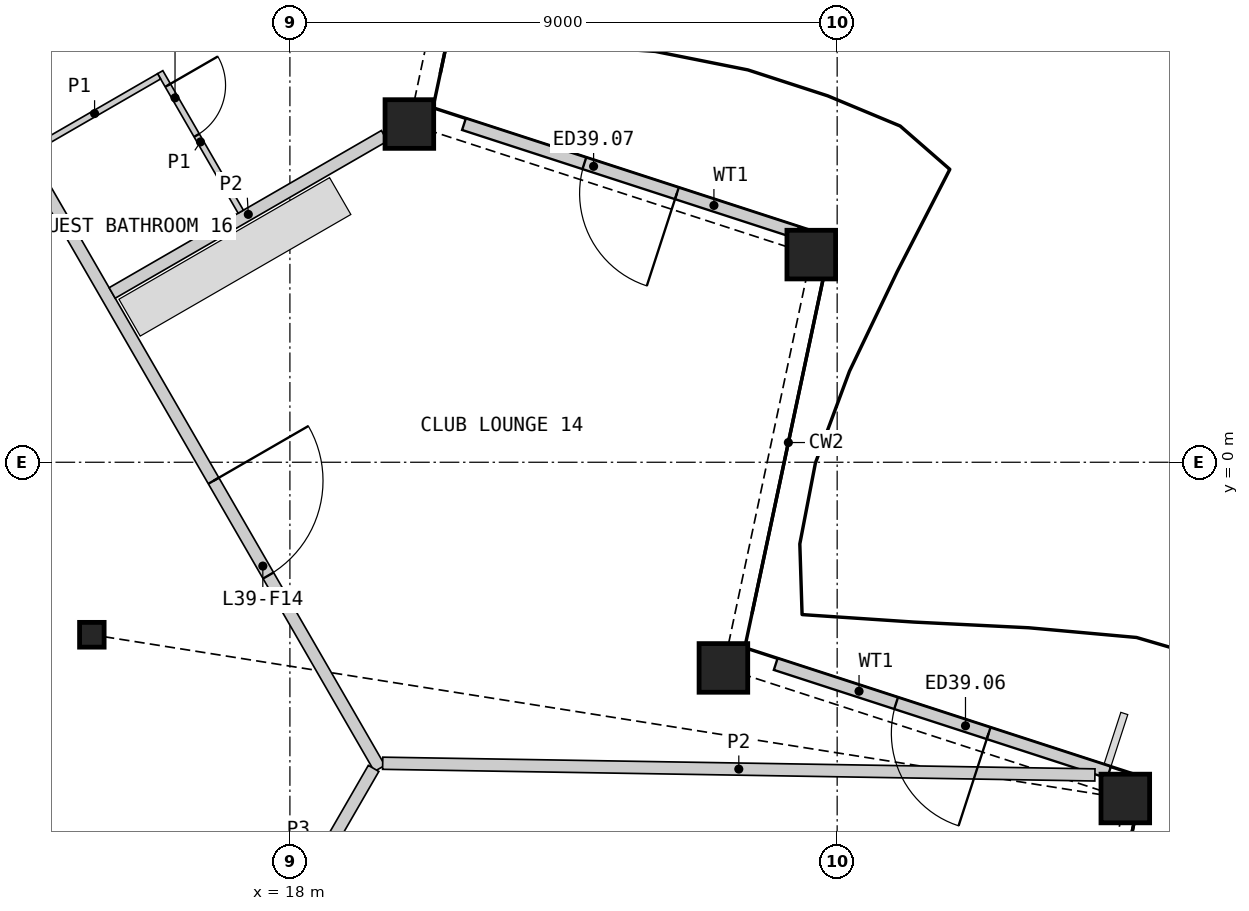
"""IFC4 building model, lengths in metres.
Left out: names, types, materials, properties, quantities, classifications, styles, units other than length and angle.
Written with IfcOpenShell. Run it as: python <this file> out.ifc"""

import sys

from ifc_helpers import new_model, si_unit, direction, frame, frame_2d, origin, origin_2d, place, context, subcontext, project, spatial, rectangle, hollow_rectangle, i_section, extrude, element, fill, save


model = new_model("IFC4")
c1 = context("Model", 3, precision=1e-05, world=origin(), true_north=direction((0.0, 1.0)))
c2 = subcontext(c1, "Body", "Model", "MODEL_VIEW")
j1 = project(units=[si_unit("LENGTHUNIT", "METRE"), si_unit("PLANEANGLEUNIT", "RADIAN")], contexts=[c1])
p1 = place(None, origin())
s1 = spatial("IfcSite", under=j1, at=p1, CompositionType="ELEMENT")
p2 = place(p1, origin())
s2 = spatial("IfcBuilding", under=s1, at=p2, CompositionType="ELEMENT")
p3 = place(p2, frame((0.0, 0.0, 183.6)))
s3 = spatial("IfcBuildingStorey", under=s2, at=p3, CompositionType="ELEMENT", Elevation=183.6)
for number, where, z_axis, x_axis in (
    (1, (31.739, -5.53, 0.0), (0.0, 0.0, 1.0), (1.0, 0.0, 0.0)),
    (2, (25.129, -3.383, 0.0), (0.0, 0.0, 1.0), (1.0, 0.0, 0.0)),
    (3, (26.574, 3.415, 0.0), (0.0, 0.0, 1.0), (1.0, 0.0, 0.0)),
    (4, (19.965, 5.563, 0.0), (0.0, 0.0, 1.0), (1.0, 0.0, 0.0)),
):
    element("IfcColumn", number, at=place(p3, frame(where, z_axis=z_axis, x_axis=x_axis)), inside=s3, PredefinedType="COLUMN", context=c2, shape_type="SweptSolid", body=[
        extrude(hollow_rectangle(XDim=0.8, YDim=0.8, WallThickness=0.05, at=origin_2d()), origin(), (0.0, 0.0, 1.0), 3.6),
    ])
p4 = place(p3, frame((14.743, -2.837, 0.0), z_axis=(0.0, 0.0, 1.0), x_axis=(1.0, 0.0, 0.0)))
e5 = element("IfcColumn", 5, at=p4, inside=s3, PredefinedType="COLUMN", context=c2, shape_type="SweptSolid", body=[
    extrude(i_section(OverallWidth=0.404, OverallDepth=0.407, WebThickness=0.027, FlangeThickness=0.044, at=origin_2d()), origin(), (0.0, 0.0, 1.0), 3.6),
])
p5 = place(p3, frame((31.471, -5.101, 0.0), z_axis=(0.0, 0.0, 1.0), x_axis=(-0.951053678976, 0.30902572661, 0.0)))
e6 = element("IfcWall", 6, at=p5, inside=s3, PredefinedType="SOLIDWALL", context=c2, shape_type="SweptSolid", body=[
    extrude(rectangle(XDim=5.763, YDim=0.2, at=frame_2d((2.882, 0.0))), origin(), (0.0, 0.0, 1.0), 2.701),
])
p6 = place(p5, frame((2.082, 0.0, 0.0)))
e7 = element("IfcOpeningElement", 7, at=p6, cuts=e6, PredefinedType="OPENING", context=c2, shape_type="SweptSolid", body=[
    extrude(rectangle(XDim=1.6, YDim=2.4, at=frame_2d((0.8, 1.2))), frame((0.0, 0.11, 0.0), z_axis=(0.0, -1.0, 0.0), x_axis=(1.0, 0.0, 0.0)), (0.0, 0.0, 1.0), 0.22),
])
p7 = place(p3, frame((26.344, 3.779, 0.0), z_axis=(0.0, 0.0, 1.0), x_axis=(-0.951049633358, 0.309038177075, 0.0)))
e8 = element("IfcWall", 8, at=p7, inside=s3, PredefinedType="SOLIDWALL", context=c2, shape_type="SweptSolid", body=[
    extrude(rectangle(XDim=5.763, YDim=0.2, at=frame_2d((2.881, 0.0))), origin(), (0.0, 0.0, 1.0), 2.701),
])
p8 = place(p7, frame((2.082, 0.0, 0.0)))
e9 = element("IfcOpeningElement", 9, at=p8, cuts=e8, PredefinedType="OPENING", context=c2, shape_type="SweptSolid", body=[
    extrude(rectangle(XDim=1.6, YDim=2.4, at=frame_2d((0.8, 1.2))), frame((0.0, 0.11, 0.0), z_axis=(0.0, -1.0, 0.0), x_axis=(1.0, 0.0, 0.0)), (0.0, 0.0, 1.0), 0.22),
])
p9 = place(p3, frame((14.526, -8.011, 0.0), z_axis=(0.0, 0.0, 1.0), x_axis=(-0.499996970966, 0.866027152591, 0.0)))
e10 = element("IfcWall", 10, at=p9, inside=s3, PredefinedType="SHEAR", context=c2, shape_type="SweptSolid", body=[
    extrude(rectangle(XDim=3.798, YDim=0.75, at=frame_2d((1.899, 0.0))), origin(), (0.0, 0.0, 1.0), 3.25),
])
p10 = place(p3, frame((5.377, 19.385, 0.0), z_axis=(0.0, 0.0, 1.0), x_axis=(0.500000757641, -0.86602496636, 0.0)))
e11 = element("IfcWall", 11, at=p10, inside=s3, PredefinedType="PARTITIONING", context=c2, shape_type="SweptSolid", body=[
    extrude(rectangle(XDim=28.198, YDim=0.2, at=frame_2d((14.099, 0.0))), origin(), (0.0, 0.0, 1.0), 3.25),
])
p11 = place(p10, frame((22.735, 0.0, 0.0)))
e12 = element("IfcOpeningElement", 12, at=p11, cuts=e11, PredefinedType="OPENING", context=c2, shape_type="SweptSolid", body=[
    extrude(rectangle(XDim=1.8, YDim=2.1, at=frame_2d((0.9, 1.05))), frame((0.0, 0.11, 0.0), z_axis=(0.0, -1.0, 0.0), x_axis=(1.0, 0.0, 0.0)), (0.0, 0.0, 1.0), 0.22),
])
p12 = place(p10, frame((14.402, 0.0, 0.0)))
e13 = element("IfcOpeningElement", 13, at=p12, cuts=e11, PredefinedType="OPENING", context=c2, shape_type="SweptSolid", body=[
    extrude(rectangle(XDim=1.0, YDim=2.1, at=frame_2d((0.5, 1.05))), frame((0.0, 0.11, 0.0), z_axis=(0.0, -1.0, 0.0), x_axis=(1.0, 0.0, 0.0)), (0.0, 0.0, 1.0), 0.22),
])
p13 = place(p10, frame((12.796, 0.0, 0.0)))
e14 = element("IfcOpeningElement", 14, at=p13, cuts=e11, PredefinedType="OPENING", context=c2, shape_type="SweptSolid", body=[
    extrude(rectangle(XDim=1.0, YDim=2.1, at=frame_2d((0.5, 1.05))), frame((0.0, 0.11, 0.0), z_axis=(0.0, -1.0, 0.0), x_axis=(1.0, 0.0, 0.0)), (0.0, 0.0, 1.0), 0.22),
])
p14 = place(p10, frame((4.164, 0.0, 0.0)))
e15 = element("IfcOpeningElement", 15, at=p14, cuts=e11, PredefinedType="OPENING", context=c2, shape_type="SweptSolid", body=[
    extrude(rectangle(XDim=1.0, YDim=2.1, at=frame_2d((0.5, 1.05))), frame((0.0, 0.11, 0.0), z_axis=(0.0, -1.0, 0.0), x_axis=(1.0, 0.0, 0.0)), (0.0, 0.0, 1.0), 0.22),
])
p15 = place(p10, frame((1.452, 0.0, 0.0)))
e16 = element("IfcOpeningElement", 16, at=p15, cuts=e11, PredefinedType="OPENING", context=c2, shape_type="SweptSolid", body=[
    extrude(rectangle(XDim=0.95, YDim=2.1, at=frame_2d((0.475, 1.05))), frame((0.0, 0.11, 0.0), z_axis=(0.0, -1.0, 0.0), x_axis=(1.0, 0.0, 0.0)), (0.0, 0.0, 1.0), 0.22),
])
p16 = place(p3, frame((17.875, -7.635, 0.0), z_axis=(0.0, 0.0, 1.0), x_axis=(0.499952404951, 0.866052881055, 0.0)))
e17 = element("IfcWall", 17, at=p16, inside=s3, PredefinedType="PARTITIONING", context=c2, shape_type="SweptSolid", body=[
    extrude(rectangle(XDim=3.002, YDim=0.2, at=frame_2d((1.501, 0.0))), origin(), (0.0, 0.0, 1.0), 3.25),
])
p17 = place(p3, frame((19.526, -4.95, 0.0), z_axis=(0.0, 0.0, 1.0), x_axis=(0.99986514458, -0.016422321819, 0.0)))
e18 = element("IfcWall", 18, at=p17, inside=s3, PredefinedType="PARTITIONING", context=c2, shape_type="SweptSolid", body=[
    extrude(rectangle(XDim=11.715, YDim=0.2, at=frame_2d((5.857, 0.0))), origin(), (0.0, 0.0, 1.0), 2.404),
])
p18 = place(p3, frame((15.077, 2.784, 0.0), z_axis=(0.0, 0.0, 1.0), x_axis=(0.866020469142, 0.500008546953, 0.0)))
e19 = element("IfcWall", 19, at=p18, inside=s3, PredefinedType="PARTITIONING", context=c2, shape_type="SweptSolid", body=[
    extrude(rectangle(XDim=5.171, YDim=0.2, at=frame_2d((2.585, 0.0))), origin(), (0.0, 0.0, 1.0), 2.404),
])
p19 = place(p3, frame((15.867, 6.416, 0.0), z_axis=(0.0, 0.0, 1.0), x_axis=(0.500062700197, -0.865989200783, 0.0)))
e20 = element("IfcWall", 20, at=p19, inside=s3, PredefinedType="PARTITIONING", context=c2, shape_type="SweptSolid", body=[
    extrude(rectangle(XDim=2.65, YDim=0.1, at=frame_2d((1.325, 0.0))), origin(), (0.0, 0.0, 1.0), 2.404),
])
p20 = place(p19, frame((0.25, 0.0, 0.0)))
e21 = element("IfcOpeningElement", 21, at=p20, cuts=e20, PredefinedType="OPENING", context=c2, shape_type="SweptSolid", body=[
    extrude(rectangle(XDim=0.95, YDim=2.1, at=frame_2d((0.475, 1.05))), frame((0.0, 0.06, 0.0), z_axis=(0.0, -1.0, 0.0), x_axis=(1.0, 0.0, 0.0)), (0.0, 0.0, 1.0), 0.12),
])
p21 = place(p3, frame((13.727, 5.123, 0.0), z_axis=(0.0, 0.0, 1.0), x_axis=(0.866032905446, 0.499987006516, 0.0)))
e22 = element("IfcWall", 22, at=p21, inside=s3, PredefinedType="PARTITIONING", context=c2, shape_type="SweptSolid", body=[
    extrude(rectangle(XDim=2.45, YDim=0.1, at=frame_2d((1.225, 0.0))), origin(), (0.0, 0.0, 1.0), 2.404),
])
p22 = place(p6, origin())
e23 = element("IfcDoor", 23, at=p22, inside=s3, OperationType="DOUBLE_DOOR_SINGLE_SWING", PredefinedType="DOOR", context=c2, shape_type="SweptSolid", body=[
    extrude(rectangle(XDim=1.6, YDim=2.4, at=frame_2d((0.8, 1.2))), frame((0.0, 0.025, 0.0), z_axis=(0.0, -1.0, 0.0), x_axis=(1.0, 0.0, 0.0)), (0.0, 0.0, 1.0), 0.05),
])
fill(e7, e23)
p23 = place(p8, origin())
e24 = element("IfcDoor", 24, at=p23, inside=s3, OperationType="DOUBLE_DOOR_SINGLE_SWING", PredefinedType="DOOR", context=c2, shape_type="SweptSolid", body=[
    extrude(rectangle(XDim=1.6, YDim=2.4, at=frame_2d((0.8, 1.2))), frame((0.0, 0.025, 0.0), z_axis=(0.0, -1.0, 0.0), x_axis=(1.0, 0.0, 0.0)), (0.0, 0.0, 1.0), 0.05),
])
fill(e9, e24)
p24 = place(p11, origin())
e25 = element("IfcDoor", 25, at=p24, inside=s3, OperationType="DOUBLE_DOOR_SINGLE_SWING", PredefinedType="DOOR", context=c2, shape_type="SweptSolid", body=[
    extrude(rectangle(XDim=1.8, YDim=2.1, at=frame_2d((0.9, 1.05))), frame((0.0, 0.025, 0.0), z_axis=(0.0, -1.0, 0.0), x_axis=(1.0, 0.0, 0.0)), (0.0, 0.0, 1.0), 0.05),
])
fill(e12, e25)
p25 = place(p20, origin())
e26 = element("IfcDoor", 26, at=p25, inside=s3, OperationType="SINGLE_SWING_LEFT", PredefinedType="DOOR", context=c2, shape_type="SweptSolid", body=[
    extrude(rectangle(XDim=0.95, YDim=2.1, at=frame_2d((0.475, 1.05))), frame((0.0, 0.025, 0.0), z_axis=(0.0, -1.0, 0.0), x_axis=(1.0, 0.0, 0.0)), (0.0, 0.0, 1.0), 0.05),
])
fill(e21, e26)
save(model, sys.argv[1])
